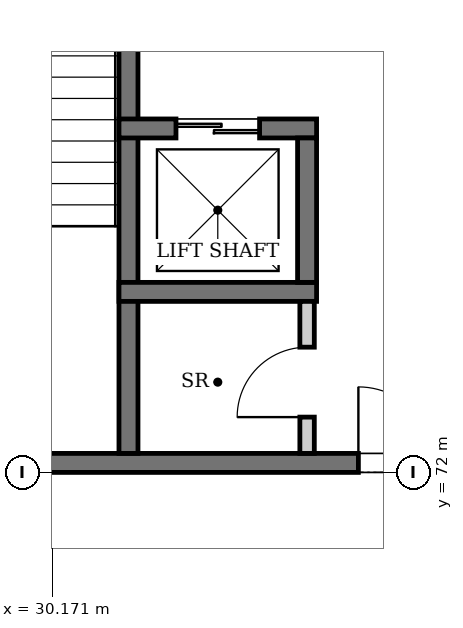
"""IFC4 building model, lengths in metres.
Left out: names, types, materials, properties, quantities, classifications, styles, units other than length and angle.
Written with IfcOpenShell. Run it as: python <this file> out.ifc"""

import sys

from ifc_helpers import new_model, si_unit, direction, frame, frame_2d, origin, place, context, subcontext, project, spatial, rectangle, extrude, element, fill, save


model = new_model("IFC4")
c1 = context("Model", 3, precision=1e-05, world=origin(), true_north=direction((0.0, 1.0)))
c2 = subcontext(c1, "Body", "Model", "MODEL_VIEW")
j1 = project(units=[si_unit("LENGTHUNIT", "METRE"), si_unit("PLANEANGLEUNIT", "RADIAN")], contexts=[c1])
p1 = place(None, origin())
s1 = spatial("IfcSite", under=j1, at=p1, CompositionType="ELEMENT")
p2 = place(p1, origin())
s2 = spatial("IfcBuilding", under=s1, at=p2, CompositionType="ELEMENT")
p3 = place(p2, frame((0.0, 0.0, 6.0)))
s3 = spatial("IfcBuildingStorey", under=s2, at=p3, CompositionType="ELEMENT", Elevation=6.0)
p4 = place(p3, frame((27.25, 72.125, 0.0), z_axis=(0.0, 0.0, 1.0), x_axis=(1.0, 0.0, 0.0)))
e1 = element("IfcWall", 1, at=p4, inside=s3, PredefinedType="SHEAR", context=c2, shape_type="SweptSolid", body=[
    extrude(rectangle(XDim=8.5, YDim=0.25, at=frame_2d((4.25, 0.0))), origin(), (0.0, 0.0, 1.0), 4.5),
])
p5 = place(p4, frame((6.95, 0.0, 0.0)))
e2 = element("IfcOpeningElement", 2, at=p5, cuts=e1, PredefinedType="OPENING", context=c2, shape_type="SweptSolid", body=[
    extrude(rectangle(XDim=1.0, YDim=2.1, at=frame_2d((0.5, 1.05))), frame((0.0, 0.135, 0.0), z_axis=(0.0, -1.0, 0.0), x_axis=(1.0, 0.0, 0.0)), (0.0, 0.0, 1.0), 0.27),
])
p6 = place(p3, frame((31.175, 80.4, 0.0), z_axis=(0.0, 0.0, 1.0), x_axis=(0.0, -1.0, 0.0)))
e3 = element("IfcWall", 3, at=p6, inside=s3, PredefinedType="SOLIDWALL", context=c2, shape_type="SweptSolid", body=[
    extrude(rectangle(XDim=8.15, YDim=0.25, at=frame_2d((4.075, 0.0))), origin(), (0.0, 0.0, 1.0), 4.25),
])
p7 = place(p6, frame((0.4, 0.0, 0.0)))
e4 = element("IfcOpeningElement", 4, at=p7, cuts=e3, PredefinedType="OPENING", context=c2, shape_type="SweptSolid", body=[
    extrude(rectangle(XDim=1.0, YDim=2.1, at=frame_2d((0.5, 1.05))), frame((0.0, 0.135, 0.0), z_axis=(0.0, -1.0, 0.0), x_axis=(1.0, 0.0, 0.0)), (0.0, 0.0, 1.0), 0.27),
])
p8 = place(p3, frame((31.05, 74.375, 0.0), z_axis=(0.0, 0.0, 1.0), x_axis=(1.0, 0.0, 0.0)))
e5 = element("IfcWall", 5, at=p8, inside=s3, PredefinedType="SOLIDWALL", context=c2, shape_type="SweptSolid", body=[
    extrude(rectangle(XDim=2.6, YDim=0.25, at=frame_2d((1.3, 0.0))), origin(), (0.0, 0.0, 1.0), 4.5),
])
p9 = place(p3, frame((31.05, 76.525, 0.0), z_axis=(0.0, 0.0, 1.0), x_axis=(1.0, 0.0, 0.0)))
e6 = element("IfcWall", 6, at=p9, inside=s3, PredefinedType="SOLIDWALL", context=c2, shape_type="SweptSolid", body=[
    extrude(rectangle(XDim=2.6, YDim=0.25, at=frame_2d((1.3, 0.0))), origin(), (0.0, 0.0, 1.0), 4.5),
])
p10 = place(p9, frame((0.75, 0.0, 0.0)))
e7 = element("IfcOpeningElement", 7, at=p10, cuts=e6, PredefinedType="OPENING", context=c2, shape_type="SweptSolid", body=[
    extrude(rectangle(XDim=1.1, YDim=2.1, at=frame_2d((0.55, 1.05))), frame((0.0, 0.135, 0.0), z_axis=(0.0, -1.0, 0.0), x_axis=(1.0, 0.0, 0.0)), (0.0, 0.0, 1.0), 0.27),
])
p11 = place(p3, frame((33.525, 74.5, 0.0), z_axis=(0.0, 0.0, 1.0), x_axis=(0.0, 1.0, 0.0)))
e8 = element("IfcWall", 8, at=p11, inside=s3, PredefinedType="SOLIDWALL", context=c2, shape_type="SweptSolid", body=[
    extrude(rectangle(XDim=1.9, YDim=0.25, at=frame_2d((0.95, 0.0))), origin(), (0.0, 0.0, 1.0), 4.5),
])
p12 = place(p3, frame((33.525, 72.25, 0.0), z_axis=(0.0, 0.0, 1.0), x_axis=(0.0, 1.0, 0.0)))
e9 = element("IfcWall", 9, at=p12, inside=s3, PredefinedType="PARTITIONING", context=c2, shape_type="SweptSolid", body=[
    extrude(rectangle(XDim=2.0, YDim=0.19, at=frame_2d((1.0, 0.0))), origin(), (0.0, 0.0, 1.0), 4.25),
])
p13 = place(p12, frame((0.478, 0.0, 0.0)))
e10 = element("IfcOpeningElement", 10, at=p13, cuts=e9, PredefinedType="OPENING", context=c2, shape_type="SweptSolid", body=[
    extrude(rectangle(XDim=0.92, YDim=2.1, at=frame_2d((0.46, 1.05))), frame((0.0, 0.105, 0.0), z_axis=(0.0, -1.0, 0.0), x_axis=(1.0, 0.0, 0.0)), (0.0, 0.0, 1.0), 0.21),
])
p14 = place(p10, origin())
e11 = element("IfcDoor", 11, at=p14, inside=s3, OperationType="DOUBLE_DOOR_SLIDING", PredefinedType="DOOR", context=c2, shape_type="SweptSolid", body=[
    extrude(rectangle(XDim=1.1, YDim=2.1, at=frame_2d((0.55, 1.05))), frame((0.0, 0.025, 0.0), z_axis=(0.0, -1.0, 0.0), x_axis=(1.0, 0.0, 0.0)), (0.0, 0.0, 1.0), 0.05),
])
fill(e7, e11)
p15 = place(p5, origin())
e12 = element("IfcDoor", 12, at=p15, inside=s3, OperationType="SINGLE_SWING_LEFT", PredefinedType="DOOR", context=c2, shape_type="SweptSolid", body=[
    extrude(rectangle(XDim=1.0, YDim=2.1, at=frame_2d((0.5, 1.05))), frame((0.0, 0.025, 0.0), z_axis=(0.0, -1.0, 0.0), x_axis=(1.0, 0.0, 0.0)), (0.0, 0.0, 1.0), 0.05),
])
fill(e2, e12)
p16 = place(p13, origin())
e13 = element("IfcDoor", 13, at=p16, inside=s3, OperationType="SINGLE_SWING_LEFT", PredefinedType="DOOR", context=c2, shape_type="SweptSolid", body=[
    extrude(rectangle(XDim=0.92, YDim=2.1, at=frame_2d((0.46, 1.05))), frame((0.0, 0.025, 0.0), z_axis=(0.0, -1.0, 0.0), x_axis=(1.0, 0.0, 0.0)), (0.0, 0.0, 1.0), 0.05),
])
fill(e10, e13)
save(model, sys.argv[1])
